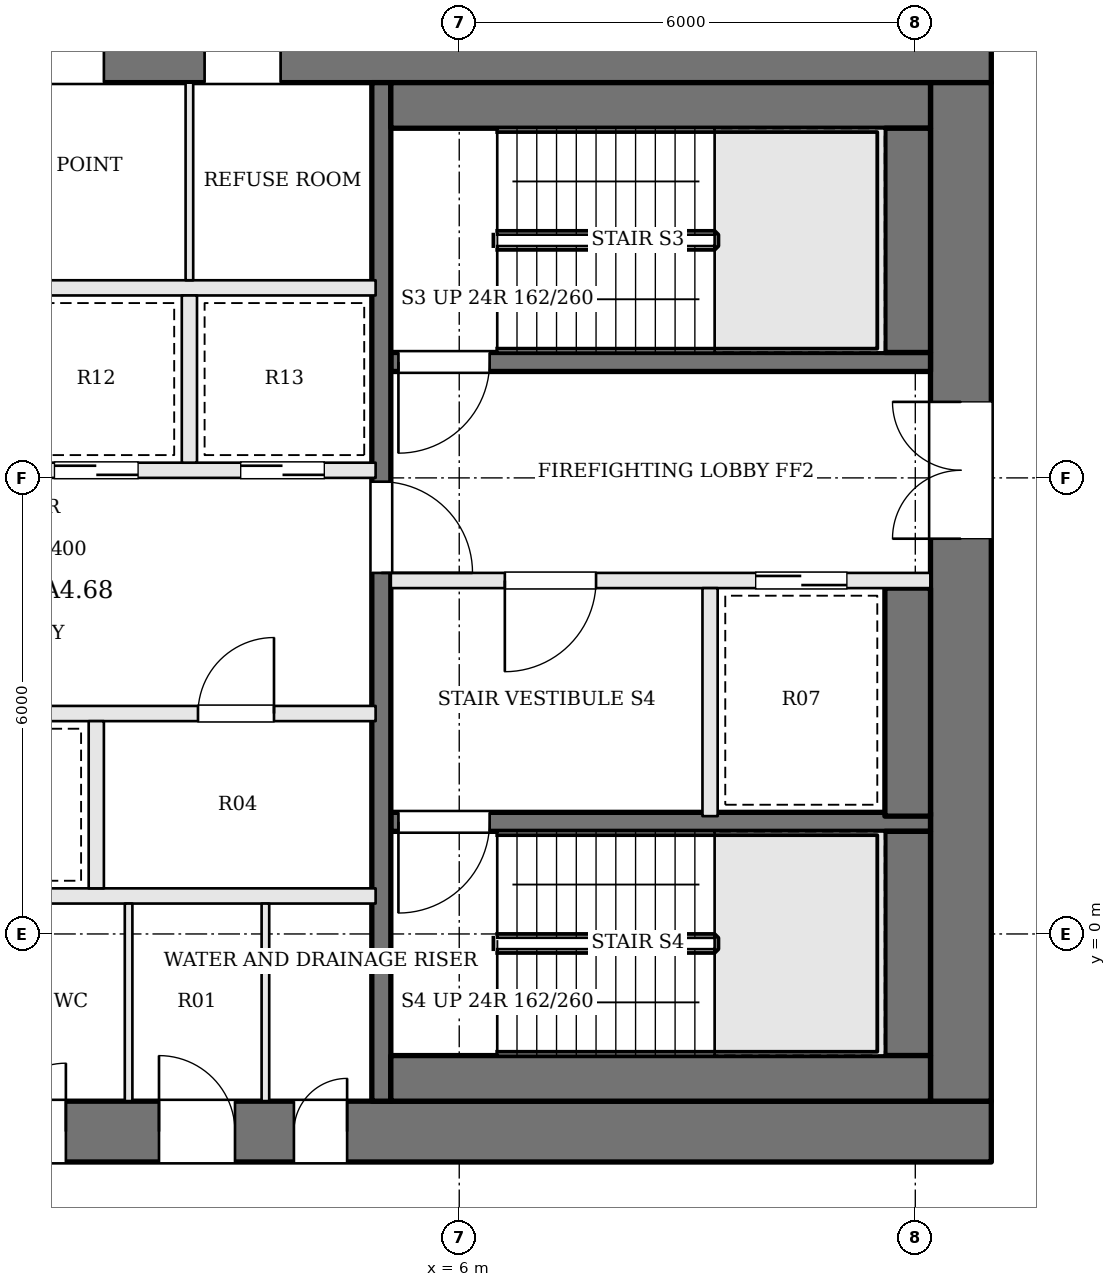
"""IFC4 building model, lengths in metres.
Left out: names, types, materials, properties, quantities, classifications, styles, units other than length and angle.
Written with IfcOpenShell. Run it as: python <this file> out.ifc"""

import sys

from ifc_helpers import new_model, si_unit, direction, frame, frame_2d, origin, place, context, subcontext, project, spatial, rectangle, extrude, element, fill, save


model = new_model("IFC4")
c1 = context("Model", 3, precision=1e-05, world=origin(), true_north=direction((0.0, 1.0)))
c2 = subcontext(c1, "Body", "Model", "MODEL_VIEW")
j1 = project(units=[si_unit("LENGTHUNIT", "METRE"), si_unit("PLANEANGLEUNIT", "RADIAN")], contexts=[c1])
p1 = place(None, origin())
s1 = spatial("IfcSite", under=j1, at=p1, CompositionType="ELEMENT")
p2 = place(p1, origin())
s2 = spatial("IfcBuilding", under=s1, at=p2, CompositionType="ELEMENT")
p3 = place(p2, frame((0.0, 0.0, 260.4)))
s3 = spatial("IfcBuildingStorey", under=s2, at=p3, CompositionType="ELEMENT", Elevation=260.4)
p4 = place(p3, frame((-13.0, 11.6, 0.0), z_axis=(0.0, 0.0, 1.0), x_axis=(1.0, 0.0, 0.0)))
e1 = element("IfcWall", 1, at=p4, inside=s3, PredefinedType="SHEAR", context=c2, shape_type="SweptSolid", body=[
    extrude(rectangle(XDim=26.0, YDim=0.8, at=frame_2d((13.0, 0.0))), origin(), (0.0, 0.0, 1.0), 3.9),
])
p5 = place(p4, frame((8.575, 0.0, 0.0)))
e2 = element("IfcOpeningElement", 2, at=p5, cuts=e1, PredefinedType="OPENING", context=c2, shape_type="SweptSolid", body=[
    extrude(rectangle(XDim=0.7, YDim=2.1, at=frame_2d((0.35, 1.05))), frame((0.0, 0.41, 0.0), z_axis=(0.0, -1.0, 0.0), x_axis=(1.0, 0.0, 0.0)), (0.0, 0.0, 1.0), 0.82),
])
p6 = place(p4, frame((10.625, 0.0, 0.0)))
e3 = element("IfcOpeningElement", 3, at=p6, cuts=e1, PredefinedType="OPENING", context=c2, shape_type="SweptSolid", body=[
    extrude(rectangle(XDim=0.7, YDim=2.1, at=frame_2d((0.35, 1.05))), frame((0.0, 0.41, 0.0), z_axis=(0.0, -1.0, 0.0), x_axis=(1.0, 0.0, 0.0)), (0.0, 0.0, 1.0), 0.82),
])
p7 = place(p4, frame((13.325, 0.0, 0.0)))
e4 = element("IfcOpeningElement", 4, at=p7, cuts=e1, PredefinedType="OPENING", context=c2, shape_type="SweptSolid", body=[
    extrude(rectangle(XDim=1.0, YDim=2.1, at=frame_2d((0.5, 1.05))), frame((0.0, 0.41, 0.0), z_axis=(0.0, -1.0, 0.0), x_axis=(1.0, 0.0, 0.0)), (0.0, 0.0, 1.0), 0.82),
])
p8 = place(p4, frame((15.65, 0.0, 0.0)))
e5 = element("IfcOpeningElement", 5, at=p8, cuts=e1, PredefinedType="OPENING", context=c2, shape_type="SweptSolid", body=[
    extrude(rectangle(XDim=1.0, YDim=2.1, at=frame_2d((0.5, 1.05))), frame((0.0, 0.41, 0.0), z_axis=(0.0, -1.0, 0.0), x_axis=(1.0, 0.0, 0.0)), (0.0, 0.0, 1.0), 0.82),
])
p9 = place(p3, frame((-13.0, -2.6, 0.0), z_axis=(0.0, 0.0, 1.0), x_axis=(1.0, 0.0, 0.0)))
e6 = element("IfcWall", 6, at=p9, inside=s3, PredefinedType="SHEAR", context=c2, shape_type="SweptSolid", body=[
    extrude(rectangle(XDim=26.0, YDim=0.8, at=frame_2d((13.0, 0.0))), origin(), (0.0, 0.0, 1.0), 3.9),
])
p10 = place(p9, frame((9.65, 0.0, 0.0)))
e7 = element("IfcOpeningElement", 7, at=p10, cuts=e6, PredefinedType="OPENING", context=c2, shape_type="SweptSolid", body=[
    extrude(rectangle(XDim=0.9, YDim=2.1, at=frame_2d((0.45, 1.05))), frame((0.0, 0.41, 0.0), z_axis=(0.0, -1.0, 0.0), x_axis=(1.0, 0.0, 0.0)), (0.0, 0.0, 1.0), 0.82),
])
p11 = place(p9, frame((12.925, 0.0, 0.0)))
e8 = element("IfcOpeningElement", 8, at=p11, cuts=e6, PredefinedType="OPENING", context=c2, shape_type="SweptSolid", body=[
    extrude(rectangle(XDim=0.9, YDim=2.1, at=frame_2d((0.45, 1.05))), frame((0.0, 0.41, 0.0), z_axis=(0.0, -1.0, 0.0), x_axis=(1.0, 0.0, 0.0)), (0.0, 0.0, 1.0), 0.82),
])
p12 = place(p9, frame((15.05, 0.0, 0.0)))
e9 = element("IfcOpeningElement", 9, at=p12, cuts=e6, PredefinedType="OPENING", context=c2, shape_type="SweptSolid", body=[
    extrude(rectangle(XDim=1.0, YDim=2.1, at=frame_2d((0.5, 1.05))), frame((0.0, 0.41, 0.0), z_axis=(0.0, -1.0, 0.0), x_axis=(1.0, 0.0, 0.0)), (0.0, 0.0, 1.0), 0.82),
])
p13 = place(p9, frame((16.825, 0.0, 0.0)))
e10 = element("IfcOpeningElement", 10, at=p13, cuts=e6, PredefinedType="OPENING", context=c2, shape_type="SweptSolid", body=[
    extrude(rectangle(XDim=0.7, YDim=2.1, at=frame_2d((0.35, 1.05))), frame((0.0, 0.41, 0.0), z_axis=(0.0, -1.0, 0.0), x_axis=(1.0, 0.0, 0.0)), (0.0, 0.0, 1.0), 0.82),
])
p14 = place(p3, frame((12.6, -2.2, 0.0), z_axis=(0.0, 0.0, 1.0), x_axis=(0.0, 1.0, 0.0)))
e11 = element("IfcWall", 11, at=p14, inside=s3, PredefinedType="SHEAR", context=c2, shape_type="SweptSolid", body=[
    extrude(rectangle(XDim=13.4, YDim=0.8, at=frame_2d((6.7, 0.0))), origin(), (0.0, 0.0, 1.0), 3.9),
])
p15 = place(p14, frame((7.4, 0.0, 0.0)))
e12 = element("IfcOpeningElement", 12, at=p15, cuts=e11, PredefinedType="OPENING", context=c2, shape_type="SweptSolid", body=[
    extrude(rectangle(XDim=1.8, YDim=2.1, at=frame_2d((0.9, 1.05))), frame((0.0, 0.41, 0.0), z_axis=(0.0, -1.0, 0.0), x_axis=(1.0, 0.0, 0.0)), (0.0, 0.0, 1.0), 0.82),
])
p16 = place(p3, frame((12.2, 7.525, 0.0), z_axis=(0.0, 0.0, 1.0), x_axis=(-1.0, 0.0, 0.0)))
e13 = element("IfcWall", 13, at=p16, inside=s3, PredefinedType="SOLIDWALL", context=c2, shape_type="SweptSolid", body=[
    extrude(rectangle(XDim=7.1, YDim=0.25, at=frame_2d((3.55, 0.0))), origin(), (0.0, 0.0, 1.0), 3.6),
])
p17 = place(p16, frame((5.8, 0.0, 0.0)))
e14 = element("IfcOpeningElement", 14, at=p17, cuts=e13, PredefinedType="OPENING", context=c2, shape_type="SweptSolid", body=[
    extrude(rectangle(XDim=1.2, YDim=2.1, at=frame_2d((0.6, 1.05))), frame((0.0, 0.135, 0.0), z_axis=(0.0, -1.0, 0.0), x_axis=(1.0, 0.0, 0.0)), (0.0, 0.0, 1.0), 0.27),
])
p18 = place(p3, frame((12.2, 4.65, 0.0), z_axis=(0.0, 0.0, 1.0), x_axis=(-1.0, 0.0, 0.0)))
e15 = element("IfcWall", 15, at=p18, inside=s3, PredefinedType="SOLIDWALL", context=c2, shape_type="SweptSolid", body=[
    extrude(rectangle(XDim=7.1, YDim=0.2, at=frame_2d((3.55, 0.0))), origin(), (0.0, 0.0, 1.0), 3.6),
])
p19 = place(p18, frame((4.4, 0.0, 0.0)))
e16 = element("IfcOpeningElement", 16, at=p19, cuts=e15, PredefinedType="OPENING", context=c2, shape_type="SweptSolid", body=[
    extrude(rectangle(XDim=1.2, YDim=2.1, at=frame_2d((0.6, 1.05))), frame((0.0, 0.11, 0.0), z_axis=(0.0, -1.0, 0.0), x_axis=(1.0, 0.0, 0.0)), (0.0, 0.0, 1.0), 0.22),
])
p20 = place(p18, frame((1.1, 0.0, 0.0)))
e17 = element("IfcOpeningElement", 17, at=p20, cuts=e15, PredefinedType="OPENING", context=c2, shape_type="SweptSolid", body=[
    extrude(rectangle(XDim=1.2, YDim=2.1, at=frame_2d((0.6, 1.05))), frame((0.0, 0.11, 0.0), z_axis=(0.0, -1.0, 0.0), x_axis=(1.0, 0.0, 0.0)), (0.0, 0.0, 1.0), 0.22),
])
p21 = place(p3, frame((12.2, 1.475, 0.0), z_axis=(0.0, 0.0, 1.0), x_axis=(-1.0, 0.0, 0.0)))
e18 = element("IfcWall", 18, at=p21, inside=s3, PredefinedType="SOLIDWALL", context=c2, shape_type="SweptSolid", body=[
    extrude(rectangle(XDim=7.1, YDim=0.25, at=frame_2d((3.55, 0.0))), origin(), (0.0, 0.0, 1.0), 3.6),
])
p22 = place(p21, frame((5.8, 0.0, 0.0)))
e19 = element("IfcOpeningElement", 19, at=p22, cuts=e18, PredefinedType="OPENING", context=c2, shape_type="SweptSolid", body=[
    extrude(rectangle(XDim=1.2, YDim=2.1, at=frame_2d((0.6, 1.05))), frame((0.0, 0.135, 0.0), z_axis=(0.0, -1.0, 0.0), x_axis=(1.0, 0.0, 0.0)), (0.0, 0.0, 1.0), 0.27),
])
p23 = place(p3, frame((9.3, 4.55, 0.0), z_axis=(0.0, 0.0, 1.0), x_axis=(0.0, -1.0, 0.0)))
e20 = element("IfcWall", 20, at=p23, inside=s3, PredefinedType="SOLIDWALL", context=c2, shape_type="SweptSolid", body=[
    extrude(rectangle(XDim=3.0, YDim=0.2, at=frame_2d((1.5, 0.0))), origin(), (0.0, 0.0, 1.0), 3.6),
])
p24 = place(p3, frame((4.975, 11.2, 0.0), z_axis=(0.0, 0.0, 1.0), x_axis=(0.0, -1.0, 0.0)))
e21 = element("IfcWall", 21, at=p24, inside=s3, PredefinedType="SOLIDWALL", context=c2, shape_type="SweptSolid", body=[
    extrude(rectangle(XDim=13.4, YDim=0.25, at=frame_2d((6.7, 0.0))), origin(), (0.0, 0.0, 1.0), 3.6),
])
p25 = place(p24, frame((5.25, 0.0, 0.0)))
e22 = element("IfcOpeningElement", 22, at=p25, cuts=e21, PredefinedType="OPENING", context=c2, shape_type="SweptSolid", body=[
    extrude(rectangle(XDim=1.2, YDim=2.1, at=frame_2d((0.6, 1.05))), frame((0.0, 0.135, 0.0), z_axis=(0.0, -1.0, 0.0), x_axis=(1.0, 0.0, 0.0)), (0.0, 0.0, 1.0), 0.27),
])
p26 = place(p3, frame((12.2, 10.9, 0.0), z_axis=(0.0, 0.0, 1.0), x_axis=(-1.0, 0.0, 0.0)))
e23 = element("IfcWall", 23, at=p26, inside=s3, PredefinedType="SOLIDWALL", context=c2, shape_type="SweptSolid", body=[
    extrude(rectangle(XDim=7.1, YDim=0.6, at=frame_2d((3.55, 0.0))), origin(), (0.0, 0.0, 1.0), 3.6),
])
p27 = place(p3, frame((11.9, 10.6, 0.0), z_axis=(0.0, 0.0, 1.0), x_axis=(0.0, -1.0, 0.0)))
e24 = element("IfcWall", 24, at=p27, inside=s3, PredefinedType="SOLIDWALL", context=c2, shape_type="SweptSolid", body=[
    extrude(rectangle(XDim=2.95, YDim=0.6, at=frame_2d((1.475, 0.0))), origin(), (0.0, 0.0, 1.0), 3.6),
])
p28 = place(p3, frame((11.9, 4.55, 0.0), z_axis=(0.0, 0.0, 1.0), x_axis=(0.0, -1.0, 0.0)))
e25 = element("IfcWall", 25, at=p28, inside=s3, PredefinedType="SOLIDWALL", context=c2, shape_type="SweptSolid", body=[
    extrude(rectangle(XDim=3.0, YDim=0.6, at=frame_2d((1.5, 0.0))), origin(), (0.0, 0.0, 1.0), 3.6),
])
p29 = place(p3, frame((11.9, 1.35, 0.0), z_axis=(0.0, 0.0, 1.0), x_axis=(0.0, -1.0, 0.0)))
e26 = element("IfcWall", 26, at=p29, inside=s3, PredefinedType="SOLIDWALL", context=c2, shape_type="SweptSolid", body=[
    extrude(rectangle(XDim=2.95, YDim=0.6, at=frame_2d((1.475, 0.0))), origin(), (0.0, 0.0, 1.0), 3.6),
])
p30 = place(p3, frame((12.2, -1.9, 0.0), z_axis=(0.0, 0.0, 1.0), x_axis=(-1.0, 0.0, 0.0)))
e27 = element("IfcWall", 27, at=p30, inside=s3, PredefinedType="SOLIDWALL", context=c2, shape_type="SweptSolid", body=[
    extrude(rectangle(XDim=7.1, YDim=0.6, at=frame_2d((3.55, 0.0))), origin(), (0.0, 0.0, 1.0), 3.6),
])
p31 = place(p3, frame((-4.9, 0.5, 0.0), z_axis=(0.0, 0.0, 1.0), x_axis=(1.0, 0.0, 0.0)))
e28 = element("IfcWall", 28, at=p31, inside=s3, PredefinedType="SOLIDWALL", context=c2, shape_type="SweptSolid", body=[
    extrude(rectangle(XDim=9.8, YDim=0.2, at=frame_2d((4.9, 0.0))), origin(), (0.0, 0.0, 1.0), 3.6),
])
p32 = place(p3, frame((-4.9, 2.9, 0.0), z_axis=(0.0, 0.0, 1.0), x_axis=(1.0, 0.0, 0.0)))
e29 = element("IfcWall", 29, at=p32, inside=s3, PredefinedType="SOLIDWALL", context=c2, shape_type="SweptSolid", body=[
    extrude(rectangle(XDim=9.8, YDim=0.2, at=frame_2d((4.9, 0.0))), origin(), (0.0, 0.0, 1.0), 3.6),
])
p33 = place(p32, frame((0.675, 0.0, 0.0)))
e30 = element("IfcOpeningElement", 30, at=p33, cuts=e29, PredefinedType="OPENING", context=c2, shape_type="SweptSolid", body=[
    extrude(rectangle(XDim=1.1, YDim=2.1, at=frame_2d((0.55, 1.05))), frame((0.0, 0.11, 0.0), z_axis=(0.0, -1.0, 0.0), x_axis=(1.0, 0.0, 0.0)), (0.0, 0.0, 1.0), 0.22),
])
p34 = place(p32, frame((2.613, 0.0, 0.0)))
e31 = element("IfcOpeningElement", 31, at=p34, cuts=e29, PredefinedType="OPENING", context=c2, shape_type="SweptSolid", body=[
    extrude(rectangle(XDim=0.9, YDim=2.1, at=frame_2d((0.45, 1.05))), frame((0.0, 0.11, 0.0), z_axis=(0.0, -1.0, 0.0), x_axis=(1.0, 0.0, 0.0)), (0.0, 0.0, 1.0), 0.22),
])
p35 = place(p32, frame((4.35, 0.0, 0.0)))
e32 = element("IfcOpeningElement", 32, at=p35, cuts=e29, PredefinedType="OPENING", context=c2, shape_type="SweptSolid", body=[
    extrude(rectangle(XDim=1.1, YDim=2.1, at=frame_2d((0.55, 1.05))), frame((0.0, 0.11, 0.0), z_axis=(0.0, -1.0, 0.0), x_axis=(1.0, 0.0, 0.0)), (0.0, 0.0, 1.0), 0.22),
])
p36 = place(p32, frame((7.463, 0.0, 0.0)))
e33 = element("IfcOpeningElement", 33, at=p36, cuts=e29, PredefinedType="OPENING", context=c2, shape_type="SweptSolid", body=[
    extrude(rectangle(XDim=1.0, YDim=2.1, at=frame_2d((0.5, 1.05))), frame((0.0, 0.11, 0.0), z_axis=(0.0, -1.0, 0.0), x_axis=(1.0, 0.0, 0.0)), (0.0, 0.0, 1.0), 0.22),
])
p37 = place(p3, frame((-4.9, 6.1, 0.0), z_axis=(0.0, 0.0, 1.0), x_axis=(1.0, 0.0, 0.0)))
e34 = element("IfcWall", 34, at=p37, inside=s3, PredefinedType="SOLIDWALL", context=c2, shape_type="SweptSolid", body=[
    extrude(rectangle(XDim=9.8, YDim=0.2, at=frame_2d((4.9, 0.0))), origin(), (0.0, 0.0, 1.0), 3.6),
])
p38 = place(p37, frame((0.675, 0.0, 0.0)))
e35 = element("IfcOpeningElement", 35, at=p38, cuts=e34, PredefinedType="OPENING", context=c2, shape_type="SweptSolid", body=[
    extrude(rectangle(XDim=1.1, YDim=2.1, at=frame_2d((0.55, 1.05))), frame((0.0, 0.11, 0.0), z_axis=(0.0, -1.0, 0.0), x_axis=(1.0, 0.0, 0.0)), (0.0, 0.0, 1.0), 0.22),
])
p39 = place(p37, frame((3.125, 0.0, 0.0)))
e36 = element("IfcOpeningElement", 36, at=p39, cuts=e34, PredefinedType="OPENING", context=c2, shape_type="SweptSolid", body=[
    extrude(rectangle(XDim=1.1, YDim=2.1, at=frame_2d((0.55, 1.05))), frame((0.0, 0.11, 0.0), z_axis=(0.0, -1.0, 0.0), x_axis=(1.0, 0.0, 0.0)), (0.0, 0.0, 1.0), 0.22),
])
p40 = place(p37, frame((5.575, 0.0, 0.0)))
e37 = element("IfcOpeningElement", 37, at=p40, cuts=e34, PredefinedType="OPENING", context=c2, shape_type="SweptSolid", body=[
    extrude(rectangle(XDim=1.1, YDim=2.1, at=frame_2d((0.55, 1.05))), frame((0.0, 0.11, 0.0), z_axis=(0.0, -1.0, 0.0), x_axis=(1.0, 0.0, 0.0)), (0.0, 0.0, 1.0), 0.22),
])
p41 = place(p37, frame((8.025, 0.0, 0.0)))
e38 = element("IfcOpeningElement", 38, at=p41, cuts=e34, PredefinedType="OPENING", context=c2, shape_type="SweptSolid", body=[
    extrude(rectangle(XDim=1.1, YDim=2.1, at=frame_2d((0.55, 1.05))), frame((0.0, 0.11, 0.0), z_axis=(0.0, -1.0, 0.0), x_axis=(1.0, 0.0, 0.0)), (0.0, 0.0, 1.0), 0.22),
])
p42 = place(p3, frame((-4.9, 8.5, 0.0), z_axis=(0.0, 0.0, 1.0), x_axis=(1.0, 0.0, 0.0)))
e39 = element("IfcWall", 39, at=p42, inside=s3, PredefinedType="SOLIDWALL", context=c2, shape_type="SweptSolid", body=[
    extrude(rectangle(XDim=9.8, YDim=0.2, at=frame_2d((4.9, 0.0))), origin(), (0.0, 0.0, 1.0), 3.6),
])
for number, where, z_axis, x_axis in (
    (40, (1.225, 0.6, 0.0), (0.0, 0.0, 1.0), (0.0, 1.0, 0.0)),
    (41, (2.45, 6.2, 0.0), (0.0, 0.0, 1.0), (0.0, 1.0, 0.0)),
):
    element("IfcWall", number, at=place(p3, frame(where, z_axis=z_axis, x_axis=x_axis)), inside=s3, PredefinedType="SOLIDWALL", context=c2, shape_type="SweptSolid", body=[
        extrude(rectangle(XDim=2.2, YDim=0.2, at=frame_2d((1.1, 0.0))), origin(), (0.0, 0.0, 1.0), 3.6),
    ])
for number, where, z_axis, x_axis in (
    (42, (1.65, -2.2, 0.0), (0.0, 0.0, 1.0), (0.0, 1.0, 0.0)),
    (43, (3.45, -2.2, 0.0), (0.0, 0.0, 1.0), (0.0, 1.0, 0.0)),
    (44, (2.45, 8.6, 0.0), (0.0, 0.0, 1.0), (0.0, 1.0, 0.0)),
):
    element("IfcWall", number, at=place(p3, frame(where, z_axis=z_axis, x_axis=x_axis)), inside=s3, PredefinedType="PARTITIONING", context=c2, shape_type="SweptSolid", body=[
        extrude(rectangle(XDim=2.6, YDim=0.1, at=frame_2d((1.3, 0.0))), origin(), (0.0, 0.0, 1.0), 3.6),
    ])
p43 = place(p15, origin())
e45 = element("IfcDoor", 45, at=p43, inside=s3, OperationType="DOUBLE_DOOR_SINGLE_SWING", PredefinedType="DOOR", context=c2, shape_type="SweptSolid", body=[
    extrude(rectangle(XDim=1.8, YDim=2.1, at=frame_2d((0.9, 1.05))), frame((0.0, 0.025, 0.0), z_axis=(0.0, -1.0, 0.0), x_axis=(1.0, 0.0, 0.0)), (0.0, 0.0, 1.0), 0.05),
])
fill(e12, e45)
p44 = place(p25, origin())
e46 = element("IfcDoor", 46, at=p44, inside=s3, OperationType="SINGLE_SWING_RIGHT", PredefinedType="DOOR", context=c2, shape_type="SweptSolid", body=[
    extrude(rectangle(XDim=1.2, YDim=2.1, at=frame_2d((0.6, 1.05))), frame((0.0, 0.025, 0.0), z_axis=(0.0, -1.0, 0.0), x_axis=(1.0, 0.0, 0.0)), (0.0, 0.0, 1.0), 0.05),
])
fill(e22, e46)
p45 = place(p19, origin())
e47 = element("IfcDoor", 47, at=p45, inside=s3, OperationType="SINGLE_SWING_RIGHT", PredefinedType="DOOR", context=c2, shape_type="SweptSolid", body=[
    extrude(rectangle(XDim=1.2, YDim=2.1, at=frame_2d((0.6, 1.05))), frame((0.0, 0.025, 0.0), z_axis=(0.0, -1.0, 0.0), x_axis=(1.0, 0.0, 0.0)), (0.0, 0.0, 1.0), 0.05),
])
fill(e16, e47)
p46 = place(p17, origin())
e48 = element("IfcDoor", 48, at=p46, inside=s3, OperationType="SINGLE_SWING_RIGHT", PredefinedType="DOOR", context=c2, shape_type="SweptSolid", body=[
    extrude(rectangle(XDim=1.2, YDim=2.1, at=frame_2d((0.6, 1.05))), frame((0.0, 0.025, 0.0), z_axis=(0.0, -1.0, 0.0), x_axis=(1.0, 0.0, 0.0)), (0.0, 0.0, 1.0), 0.05),
])
fill(e14, e48)
p47 = place(p22, origin())
e49 = element("IfcDoor", 49, at=p47, inside=s3, OperationType="SINGLE_SWING_RIGHT", PredefinedType="DOOR", context=c2, shape_type="SweptSolid", body=[
    extrude(rectangle(XDim=1.2, YDim=2.1, at=frame_2d((0.6, 1.05))), frame((0.0, 0.025, 0.0), z_axis=(0.0, -1.0, 0.0), x_axis=(1.0, 0.0, 0.0)), (0.0, 0.0, 1.0), 0.05),
])
fill(e19, e49)
p48 = place(p20, origin())
e50 = element("IfcDoor", 50, at=p48, inside=s3, OperationType="SLIDING_TO_RIGHT", PredefinedType="DOOR", context=c2, shape_type="SweptSolid", body=[
    extrude(rectangle(XDim=1.2, YDim=2.1, at=frame_2d((0.6, 1.05))), frame((0.0, 0.025, 0.0), z_axis=(0.0, -1.0, 0.0), x_axis=(1.0, 0.0, 0.0)), (0.0, 0.0, 1.0), 0.05),
])
fill(e17, e50)
p49 = place(p36, origin())
e51 = element("IfcDoor", 51, at=p49, inside=s3, OperationType="SINGLE_SWING_RIGHT", PredefinedType="DOOR", context=c2, shape_type="SweptSolid", body=[
    extrude(rectangle(XDim=1.0, YDim=2.1, at=frame_2d((0.5, 1.05))), frame((0.0, 0.025, 0.0), z_axis=(0.0, -1.0, 0.0), x_axis=(1.0, 0.0, 0.0)), (0.0, 0.0, 1.0), 0.05),
])
fill(e33, e51)
p50 = place(p40, origin())
e52 = element("IfcDoor", 52, at=p50, inside=s3, OperationType="SLIDING_TO_RIGHT", PredefinedType="DOOR", context=c2, shape_type="SweptSolid", body=[
    extrude(rectangle(XDim=1.1, YDim=2.1, at=frame_2d((0.55, 1.05))), frame((0.0, 0.025, 0.0), z_axis=(0.0, -1.0, 0.0), x_axis=(1.0, 0.0, 0.0)), (0.0, 0.0, 1.0), 0.05),
])
fill(e37, e52)
p51 = place(p41, origin())
e53 = element("IfcDoor", 53, at=p51, inside=s3, OperationType="SLIDING_TO_LEFT", PredefinedType="DOOR", context=c2, shape_type="SweptSolid", body=[
    extrude(rectangle(XDim=1.1, YDim=2.1, at=frame_2d((0.55, 1.05))), frame((0.0, 0.025, 0.0), z_axis=(0.0, -1.0, 0.0), x_axis=(1.0, 0.0, 0.0)), (0.0, 0.0, 1.0), 0.05),
])
fill(e38, e53)
p52 = place(p11, origin())
e54 = element("IfcDoor", 54, at=p52, inside=s3, OperationType="SINGLE_SWING_RIGHT", PredefinedType="DOOR", context=c2, shape_type="SweptSolid", body=[
    extrude(rectangle(XDim=0.9, YDim=2.1, at=frame_2d((0.45, 1.05))), frame((0.0, 0.025, 0.0), z_axis=(0.0, -1.0, 0.0), x_axis=(1.0, 0.0, 0.0)), (0.0, 0.0, 1.0), 0.05),
])
fill(e8, e54)
p53 = place(p12, origin())
e55 = element("IfcDoor", 55, at=p53, inside=s3, OperationType="SINGLE_SWING_LEFT", PredefinedType="DOOR", context=c2, shape_type="SweptSolid", body=[
    extrude(rectangle(XDim=1.0, YDim=2.1, at=frame_2d((0.5, 1.05))), frame((0.0, 0.025, 0.0), z_axis=(0.0, -1.0, 0.0), x_axis=(1.0, 0.0, 0.0)), (0.0, 0.0, 1.0), 0.05),
])
fill(e9, e55)
p54 = place(p13, origin())
e56 = element("IfcDoor", 56, at=p54, inside=s3, OperationType="SINGLE_SWING_RIGHT", PredefinedType="DOOR", context=c2, shape_type="SweptSolid", body=[
    extrude(rectangle(XDim=0.7, YDim=2.1, at=frame_2d((0.35, 1.05))), frame((0.0, 0.025, 0.0), z_axis=(0.0, -1.0, 0.0), x_axis=(1.0, 0.0, 0.0)), (0.0, 0.0, 1.0), 0.05),
])
fill(e10, e56)
p55 = place(p7, origin())
e57 = element("IfcDoor", 57, at=p55, inside=s3, OperationType="SINGLE_SWING_LEFT", PredefinedType="DOOR", context=c2, shape_type="SweptSolid", body=[
    extrude(rectangle(XDim=1.0, YDim=2.1, at=frame_2d((0.5, 1.05))), frame((0.0, 0.025, 0.0), z_axis=(0.0, -1.0, 0.0), x_axis=(1.0, 0.0, 0.0)), (0.0, 0.0, 1.0), 0.05),
])
fill(e4, e57)
p56 = place(p8, origin())
e58 = element("IfcDoor", 58, at=p56, inside=s3, OperationType="SINGLE_SWING_RIGHT", PredefinedType="DOOR", context=c2, shape_type="SweptSolid", body=[
    extrude(rectangle(XDim=1.0, YDim=2.1, at=frame_2d((0.5, 1.05))), frame((0.0, 0.025, 0.0), z_axis=(0.0, -1.0, 0.0), x_axis=(1.0, 0.0, 0.0)), (0.0, 0.0, 1.0), 0.05),
])
fill(e5, e58)
save(model, sys.argv[1])
